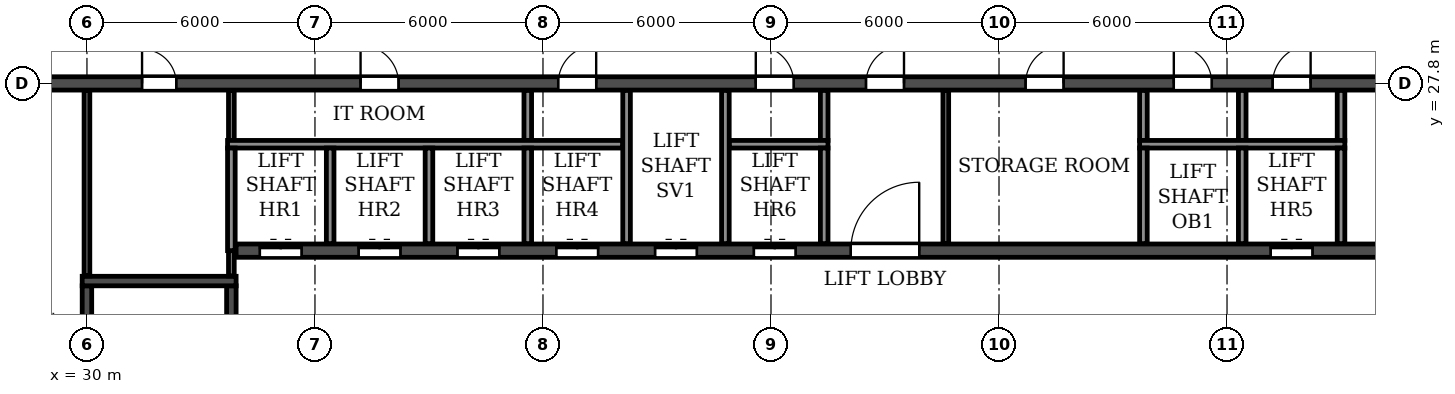
"""IFC4 building model, lengths in metres.
Left out: names, types, materials, properties, quantities, classifications, styles, units other than length and angle.
Written with IfcOpenShell. Run it as: python <this file> out.ifc"""

import sys

from ifc_helpers import new_model, si_unit, direction, frame, frame_2d, origin, place, context, subcontext, project, spatial, rectangle, extrude, element, fill, save


model = new_model("IFC4")
c1 = context("Model", 3, precision=1e-05, world=origin(), true_north=direction((0.0, 1.0)))
c2 = subcontext(c1, "Body", "Model", "MODEL_VIEW")
j1 = project(units=[si_unit("LENGTHUNIT", "METRE"), si_unit("PLANEANGLEUNIT", "RADIAN")], contexts=[c1])
p1 = place(None, origin())
s1 = spatial("IfcSite", under=j1, at=p1, CompositionType="ELEMENT")
p2 = place(p1, origin())
s2 = spatial("IfcBuilding", under=s1, at=p2, CompositionType="ELEMENT")
p3 = place(p2, frame((0.0, 0.0, 251.1)))
s3 = spatial("IfcBuildingStorey", under=s2, at=p3, CompositionType="ELEMENT", Elevation=251.1)
p4 = place(p3, frame((18.2, 27.8, 0.0), z_axis=(0.0, 0.0, 1.0), x_axis=(1.0, 0.0, 0.0)))
e1 = element("IfcWall", 1, at=p4, inside=s3, PredefinedType="SOLIDWALL", context=c2, shape_type="SweptSolid", body=[
    extrude(rectangle(XDim=65.6, YDim=0.35, at=frame_2d((32.8, 0.0))), origin(), (0.0, 0.0, 1.0), 3.08),
])
p5 = place(p4, frame((0.7, 0.0, 0.0)))
e2 = element("IfcOpeningElement", 2, at=p5, cuts=e1, PredefinedType="OPENING", context=c2, shape_type="SweptSolid", body=[
    extrude(rectangle(XDim=1.0, YDim=2.1, at=frame_2d((0.5, 1.05))), frame((0.0, 0.185, 0.0), z_axis=(0.0, -1.0, 0.0), x_axis=(1.0, 0.0, 0.0)), (0.0, 0.0, 1.0), 0.37),
])
p6 = place(p4, frame((4.05, 0.0, 0.0)))
e3 = element("IfcOpeningElement", 3, at=p6, cuts=e1, PredefinedType="OPENING", context=c2, shape_type="SweptSolid", body=[
    extrude(rectangle(XDim=0.9, YDim=2.1, at=frame_2d((0.45, 1.05))), frame((0.0, 0.185, 0.0), z_axis=(0.0, -1.0, 0.0), x_axis=(1.0, 0.0, 0.0)), (0.0, 0.0, 1.0), 0.37),
])
p7 = place(p4, frame((13.25, 0.0, 0.0)))
e4 = element("IfcOpeningElement", 4, at=p7, cuts=e1, PredefinedType="OPENING", context=c2, shape_type="SweptSolid", body=[
    extrude(rectangle(XDim=0.9, YDim=2.1, at=frame_2d((0.45, 1.05))), frame((0.0, 0.185, 0.0), z_axis=(0.0, -1.0, 0.0), x_axis=(1.0, 0.0, 0.0)), (0.0, 0.0, 1.0), 0.37),
])
p8 = place(p4, frame((19.0, 0.0, 0.0)))
e5 = element("IfcOpeningElement", 5, at=p8, cuts=e1, PredefinedType="OPENING", context=c2, shape_type="SweptSolid", body=[
    extrude(rectangle(XDim=1.0, YDim=2.1, at=frame_2d((0.5, 1.05))), frame((0.0, 0.185, 0.0), z_axis=(0.0, -1.0, 0.0), x_axis=(1.0, 0.0, 0.0)), (0.0, 0.0, 1.0), 0.37),
])
p9 = place(p4, frame((24.2, 0.0, 0.0)))
e6 = element("IfcOpeningElement", 6, at=p9, cuts=e1, PredefinedType="OPENING", context=c2, shape_type="SweptSolid", body=[
    extrude(rectangle(XDim=1.0, YDim=2.1, at=frame_2d((0.5, 1.05))), frame((0.0, 0.185, 0.0), z_axis=(0.0, -1.0, 0.0), x_axis=(1.0, 0.0, 0.0)), (0.0, 0.0, 1.0), 0.37),
])
p10 = place(p4, frame((29.4, 0.0, 0.0)))
e7 = element("IfcOpeningElement", 7, at=p10, cuts=e1, PredefinedType="OPENING", context=c2, shape_type="SweptSolid", body=[
    extrude(rectangle(XDim=1.0, YDim=2.1, at=frame_2d((0.5, 1.05))), frame((0.0, 0.185, 0.0), z_axis=(0.0, -1.0, 0.0), x_axis=(1.0, 0.0, 0.0)), (0.0, 0.0, 1.0), 0.37),
])
p11 = place(p4, frame((32.3, 0.0, 0.0)))
e8 = element("IfcOpeningElement", 8, at=p11, cuts=e1, PredefinedType="OPENING", context=c2, shape_type="SweptSolid", body=[
    extrude(rectangle(XDim=1.0, YDim=2.1, at=frame_2d((0.5, 1.05))), frame((0.0, 0.185, 0.0), z_axis=(0.0, -1.0, 0.0), x_axis=(1.0, 0.0, 0.0)), (0.0, 0.0, 1.0), 0.37),
])
p12 = place(p4, frame((36.5, 0.0, 0.0)))
e9 = element("IfcOpeningElement", 9, at=p12, cuts=e1, PredefinedType="OPENING", context=c2, shape_type="SweptSolid", body=[
    extrude(rectangle(XDim=1.0, YDim=2.1, at=frame_2d((0.5, 1.05))), frame((0.0, 0.185, 0.0), z_axis=(0.0, -1.0, 0.0), x_axis=(1.0, 0.0, 0.0)), (0.0, 0.0, 1.0), 0.37),
])
p13 = place(p4, frame((40.4, 0.0, 0.0)))
e10 = element("IfcOpeningElement", 10, at=p13, cuts=e1, PredefinedType="OPENING", context=c2, shape_type="SweptSolid", body=[
    extrude(rectangle(XDim=1.0, YDim=2.1, at=frame_2d((0.5, 1.05))), frame((0.0, 0.185, 0.0), z_axis=(0.0, -1.0, 0.0), x_axis=(1.0, 0.0, 0.0)), (0.0, 0.0, 1.0), 0.37),
])
p14 = place(p4, frame((43.0, 0.0, 0.0)))
e11 = element("IfcOpeningElement", 11, at=p14, cuts=e1, PredefinedType="OPENING", context=c2, shape_type="SweptSolid", body=[
    extrude(rectangle(XDim=1.0, YDim=2.1, at=frame_2d((0.5, 1.05))), frame((0.0, 0.185, 0.0), z_axis=(0.0, -1.0, 0.0), x_axis=(1.0, 0.0, 0.0)), (0.0, 0.0, 1.0), 0.37),
])
p15 = place(p4, frame((46.65, 0.0, 0.0)))
e12 = element("IfcOpeningElement", 12, at=p15, cuts=e1, PredefinedType="OPENING", context=c2, shape_type="SweptSolid", body=[
    extrude(rectangle(XDim=1.5, YDim=2.1, at=frame_2d((0.75, 1.05))), frame((0.0, 0.185, 0.0), z_axis=(0.0, -1.0, 0.0), x_axis=(1.0, 0.0, 0.0)), (0.0, 0.0, 1.0), 0.37),
])
p16 = place(p4, frame((51.45, 0.0, 0.0)))
e13 = element("IfcOpeningElement", 13, at=p16, cuts=e1, PredefinedType="OPENING", context=c2, shape_type="SweptSolid", body=[
    extrude(rectangle(XDim=0.9, YDim=2.1, at=frame_2d((0.45, 1.05))), frame((0.0, 0.185, 0.0), z_axis=(0.0, -1.0, 0.0), x_axis=(1.0, 0.0, 0.0)), (0.0, 0.0, 1.0), 0.37),
])
p17 = place(p4, frame((60.65, 0.0, 0.0)))
e14 = element("IfcOpeningElement", 14, at=p17, cuts=e1, PredefinedType="OPENING", context=c2, shape_type="SweptSolid", body=[
    extrude(rectangle(XDim=0.9, YDim=2.1, at=frame_2d((0.45, 1.05))), frame((0.0, 0.185, 0.0), z_axis=(0.0, -1.0, 0.0), x_axis=(1.0, 0.0, 0.0)), (0.0, 0.0, 1.0), 0.37),
])
p18 = place(p4, frame((63.9, 0.0, 0.0)))
e15 = element("IfcOpeningElement", 15, at=p18, cuts=e1, PredefinedType="OPENING", context=c2, shape_type="SweptSolid", body=[
    extrude(rectangle(XDim=1.0, YDim=2.1, at=frame_2d((0.5, 1.05))), frame((0.0, 0.185, 0.0), z_axis=(0.0, -1.0, 0.0), x_axis=(1.0, 0.0, 0.0)), (0.0, 0.0, 1.0), 0.37),
])
p19 = place(p3, frame((33.925, 23.4, 0.0), z_axis=(0.0, 0.0, 1.0), x_axis=(1.0, 0.0, 0.0)))
e16 = element("IfcWall", 16, at=p19, inside=s3, PredefinedType="SOLIDWALL", context=c2, shape_type="SweptSolid", body=[
    extrude(rectangle(XDim=34.15, YDim=0.35, at=frame_2d((17.075, 0.0))), origin(), (0.0, 0.0, 1.0), 3.08),
])
p20 = place(p19, frame((16.175, 0.0, 0.0)))
e17 = element("IfcOpeningElement", 17, at=p20, cuts=e16, PredefinedType="OPENING", context=c2, shape_type="SweptSolid", body=[
    extrude(rectangle(XDim=1.8, YDim=2.1, at=frame_2d((0.9, 1.05))), frame((0.0, 0.185, 0.0), z_axis=(0.0, -1.0, 0.0), x_axis=(1.0, 0.0, 0.0)), (0.0, 0.0, 1.0), 0.37),
])
p21 = place(p19, frame((0.625, 0.0, 0.0)))
e18 = element("IfcOpeningElement", 18, at=p21, cuts=e16, PredefinedType="OPENING", context=c2, shape_type="SweptSolid", body=[
    extrude(rectangle(XDim=1.1, YDim=2.1, at=frame_2d((0.55, 1.05))), frame((0.0, 0.185, 0.0), z_axis=(0.0, -1.0, 0.0), x_axis=(1.0, 0.0, 0.0)), (0.0, 0.0, 1.0), 0.37),
])
p22 = place(p19, frame((3.225, 0.0, 0.0)))
e19 = element("IfcOpeningElement", 19, at=p22, cuts=e16, PredefinedType="OPENING", context=c2, shape_type="SweptSolid", body=[
    extrude(rectangle(XDim=1.1, YDim=2.1, at=frame_2d((0.55, 1.05))), frame((0.0, 0.185, 0.0), z_axis=(0.0, -1.0, 0.0), x_axis=(1.0, 0.0, 0.0)), (0.0, 0.0, 1.0), 0.37),
])
p23 = place(p19, frame((5.825, 0.0, 0.0)))
e20 = element("IfcOpeningElement", 20, at=p23, cuts=e16, PredefinedType="OPENING", context=c2, shape_type="SweptSolid", body=[
    extrude(rectangle(XDim=1.1, YDim=2.1, at=frame_2d((0.55, 1.05))), frame((0.0, 0.185, 0.0), z_axis=(0.0, -1.0, 0.0), x_axis=(1.0, 0.0, 0.0)), (0.0, 0.0, 1.0), 0.37),
])
p24 = place(p19, frame((8.425, 0.0, 0.0)))
e21 = element("IfcOpeningElement", 21, at=p24, cuts=e16, PredefinedType="OPENING", context=c2, shape_type="SweptSolid", body=[
    extrude(rectangle(XDim=1.1, YDim=2.1, at=frame_2d((0.55, 1.05))), frame((0.0, 0.185, 0.0), z_axis=(0.0, -1.0, 0.0), x_axis=(1.0, 0.0, 0.0)), (0.0, 0.0, 1.0), 0.37),
])
p25 = place(p19, frame((11.025, 0.0, 0.0)))
e22 = element("IfcOpeningElement", 22, at=p25, cuts=e16, PredefinedType="OPENING", context=c2, shape_type="SweptSolid", body=[
    extrude(rectangle(XDim=1.1, YDim=2.1, at=frame_2d((0.55, 1.05))), frame((0.0, 0.185, 0.0), z_axis=(0.0, -1.0, 0.0), x_axis=(1.0, 0.0, 0.0)), (0.0, 0.0, 1.0), 0.37),
])
p26 = place(p19, frame((13.625, 0.0, 0.0)))
e23 = element("IfcOpeningElement", 23, at=p26, cuts=e16, PredefinedType="OPENING", context=c2, shape_type="SweptSolid", body=[
    extrude(rectangle(XDim=1.1, YDim=2.1, at=frame_2d((0.55, 1.05))), frame((0.0, 0.185, 0.0), z_axis=(0.0, -1.0, 0.0), x_axis=(1.0, 0.0, 0.0)), (0.0, 0.0, 1.0), 0.37),
])
p27 = place(p19, frame((27.225, 0.0, 0.0)))
e24 = element("IfcOpeningElement", 24, at=p27, cuts=e16, PredefinedType="OPENING", context=c2, shape_type="SweptSolid", body=[
    extrude(rectangle(XDim=1.1, YDim=2.1, at=frame_2d((0.55, 1.05))), frame((0.0, 0.185, 0.0), z_axis=(0.0, -1.0, 0.0), x_axis=(1.0, 0.0, 0.0)), (0.0, 0.0, 1.0), 0.37),
])
p28 = place(p3, frame((30.0, 14.775, 0.0), z_axis=(0.0, 0.0, 1.0), x_axis=(0.0, 1.0, 0.0)))
e25 = element("IfcWall", 25, at=p28, inside=s3, PredefinedType="SOLIDWALL", context=c2, shape_type="SweptSolid", body=[
    extrude(rectangle(XDim=7.7, YDim=0.25, at=frame_2d((3.85, 0.0))), origin(), (0.0, 0.0, 1.0), 3.08),
])
p29 = place(p3, frame((33.8, 14.775, 0.0), z_axis=(0.0, 0.0, 1.0), x_axis=(0.0, 1.0, 0.0)))
e26 = element("IfcWall", 26, at=p29, inside=s3, PredefinedType="SOLIDWALL", context=c2, shape_type="SweptSolid", body=[
    extrude(rectangle(XDim=7.7, YDim=0.25, at=frame_2d((3.85, 0.0))), origin(), (0.0, 0.0, 1.0), 3.08),
])
p30 = place(p29, frame((0.525, 0.0, 0.0)))
e27 = element("IfcOpeningElement", 27, at=p30, cuts=e26, PredefinedType="OPENING", context=c2, shape_type="SweptSolid", body=[
    extrude(rectangle(XDim=1.0, YDim=2.1, at=frame_2d((0.5, 1.05))), frame((0.0, 0.135, 0.0), z_axis=(0.0, -1.0, 0.0), x_axis=(1.0, 0.0, 0.0)), (0.0, 0.0, 1.0), 0.27),
])
p31 = place(p3, frame((29.875, 22.6, 0.0), z_axis=(0.0, 0.0, 1.0), x_axis=(1.0, 0.0, 0.0)))
e28 = element("IfcWall", 28, at=p31, inside=s3, PredefinedType="SOLIDWALL", context=c2, shape_type="SweptSolid", body=[
    extrude(rectangle(XDim=4.05, YDim=0.25, at=frame_2d((2.025, 0.0))), origin(), (0.0, 0.0, 1.0), 3.08),
])
p32 = place(p3, frame((52.6, 23.585, 0.0), z_axis=(0.0, 0.0, 1.0), x_axis=(0.0, 1.0, 0.0)))
e29 = element("IfcWall", 29, at=p32, inside=s3, PredefinedType="PARTITIONING", context=c2, shape_type="SweptSolid", body=[
    extrude(rectangle(XDim=4.03, YDim=0.15, at=frame_2d((2.015, 0.0))), origin(), (0.0, 0.0, 1.0), 3.08),
])
for number, where, z_axis, x_axis in (
    (30, (41.6, 26.3, 0.0), (0.0, 0.0, 1.0), (0.0, 1.0, 0.0)),
    (31, (49.4, 26.3, 0.0), (0.0, 0.0, 1.0), (0.0, 1.0, 0.0)),
    (32, (57.8, 26.3, 0.0), (0.0, 0.0, 1.0), (0.0, 1.0, 0.0)),
    (33, (60.4, 26.3, 0.0), (0.0, 0.0, 1.0), (0.0, 1.0, 0.0)),
    (34, (63.0, 26.3, 0.0), (0.0, 0.0, 1.0), (0.0, 1.0, 0.0)),
):
    element("IfcWall", number, at=place(p3, frame(where, z_axis=z_axis, x_axis=x_axis)), inside=s3, PredefinedType="PARTITIONING", context=c2, shape_type="SweptSolid", body=[
        extrude(rectangle(XDim=1.315, YDim=0.2, at=frame_2d((0.657, 0.0))), origin(), (0.0, 0.0, 1.0), 3.08),
    ])
p33 = place(p3, frame((30.0, 22.735, 0.0), z_axis=(0.0, 0.0, 1.0), x_axis=(0.0, 1.0, 0.0)))
e35 = element("IfcWall", 35, at=p33, inside=s3, PredefinedType="PARTITIONING", context=c2, shape_type="SweptSolid", body=[
    extrude(rectangle(XDim=4.88, YDim=0.15, at=frame_2d((2.44, 0.0))), origin(), (0.0, 0.0, 1.0), 3.08),
])
p34 = place(p3, frame((33.8, 22.735, 0.0), z_axis=(0.0, 0.0, 1.0), x_axis=(0.0, 1.0, 0.0)))
e36 = element("IfcWall", 36, at=p34, inside=s3, PredefinedType="PARTITIONING", context=c2, shape_type="SweptSolid", body=[
    extrude(rectangle(XDim=0.665, YDim=0.15, at=frame_2d((0.333, 0.0))), origin(), (0.0, 0.0, 1.0), 3.08),
])
p35 = place(p3, frame((33.8, 26.3, 0.0), z_axis=(0.0, 0.0, 1.0), x_axis=(0.0, 1.0, 0.0)))
e37 = element("IfcWall", 37, at=p35, inside=s3, PredefinedType="PARTITIONING", context=c2, shape_type="SweptSolid", body=[
    extrude(rectangle(XDim=1.315, YDim=0.15, at=frame_2d((0.657, 0.0))), origin(), (0.0, 0.0, 1.0), 3.08),
])
p36 = place(p3, frame((33.7, 26.2, 0.0), z_axis=(0.0, 0.0, 1.0), x_axis=(1.0, 0.0, 0.0)))
e38 = element("IfcWall", 38, at=p36, inside=s3, PredefinedType="PARTITIONING", context=c2, shape_type="SweptSolid", body=[
    extrude(rectangle(XDim=10.4, YDim=0.2, at=frame_2d((5.2, 0.0))), origin(), (0.0, 0.0, 1.0), 3.08),
])
p37 = place(p3, frame((46.9, 26.2, 0.0), z_axis=(0.0, 0.0, 1.0), x_axis=(1.0, 0.0, 0.0)))
e39 = element("IfcWall", 39, at=p37, inside=s3, PredefinedType="PARTITIONING", context=c2, shape_type="SweptSolid", body=[
    extrude(rectangle(XDim=2.6, YDim=0.2, at=frame_2d((1.3, 0.0))), origin(), (0.0, 0.0, 1.0), 3.08),
])
p38 = place(p3, frame((57.7, 26.2, 0.0), z_axis=(0.0, 0.0, 1.0), x_axis=(1.0, 0.0, 0.0)))
e40 = element("IfcWall", 40, at=p38, inside=s3, PredefinedType="PARTITIONING", context=c2, shape_type="SweptSolid", body=[
    extrude(rectangle(XDim=5.4, YDim=0.2, at=frame_2d((2.7, 0.0))), origin(), (0.0, 0.0, 1.0), 3.08),
])
p39 = place(p3, frame((33.8, 23.4, 0.0), z_axis=(0.0, 0.0, 1.0), x_axis=(0.0, 1.0, 0.0)))
e41 = element("IfcWall", 41, at=p39, inside=s3, PredefinedType="PARTITIONING", context=c2, shape_type="SweptSolid", body=[
    extrude(rectangle(XDim=2.7, YDim=0.2, at=frame_2d((1.35, 0.0))), origin(), (0.0, 0.0, 1.0), 3.08),
])
for number, where, z_axis, x_axis in (
    (42, (36.4, 23.585, 0.0), (0.0, 0.0, 1.0), (0.0, 1.0, 0.0)),
    (43, (39.0, 23.585, 0.0), (0.0, 0.0, 1.0), (0.0, 1.0, 0.0)),
    (44, (41.6, 23.585, 0.0), (0.0, 0.0, 1.0), (0.0, 1.0, 0.0)),
):
    element("IfcWall", number, at=place(p3, frame(where, z_axis=z_axis, x_axis=x_axis)), inside=s3, PredefinedType="PARTITIONING", context=c2, shape_type="SweptSolid", body=[
        extrude(rectangle(XDim=2.515, YDim=0.2, at=frame_2d((1.258, 0.0))), origin(), (0.0, 0.0, 1.0), 3.08),
    ])
for number, where, z_axis, x_axis in (
    (45, (44.2, 23.585, 0.0), (0.0, 0.0, 1.0), (0.0, 1.0, 0.0)),
    (46, (46.8, 23.585, 0.0), (0.0, 0.0, 1.0), (0.0, 1.0, 0.0)),
):
    element("IfcWall", number, at=place(p3, frame(where, z_axis=z_axis, x_axis=x_axis)), inside=s3, PredefinedType="PARTITIONING", context=c2, shape_type="SweptSolid", body=[
        extrude(rectangle(XDim=4.03, YDim=0.2, at=frame_2d((2.015, 0.0))), origin(), (0.0, 0.0, 1.0), 3.08),
    ])
for number, where, z_axis, x_axis in (
    (47, (49.4, 23.585, 0.0), (0.0, 0.0, 1.0), (0.0, 1.0, 0.0)),
    (48, (57.8, 23.585, 0.0), (0.0, 0.0, 1.0), (0.0, 1.0, 0.0)),
    (49, (60.4, 23.585, 0.0), (0.0, 0.0, 1.0), (0.0, 1.0, 0.0)),
    (50, (63.0, 23.585, 0.0), (0.0, 0.0, 1.0), (0.0, 1.0, 0.0)),
):
    element("IfcWall", number, at=place(p3, frame(where, z_axis=z_axis, x_axis=x_axis)), inside=s3, PredefinedType="PARTITIONING", context=c2, shape_type="SweptSolid", body=[
        extrude(rectangle(XDim=2.515, YDim=0.2, at=frame_2d((1.258, 0.0))), origin(), (0.0, 0.0, 1.0), 3.08),
    ])
p40 = place(p7, origin())
e51 = element("IfcDoor", 51, at=p40, inside=s3, OperationType="SINGLE_SWING_LEFT", PredefinedType="DOOR", context=c2, shape_type="SweptSolid", body=[
    extrude(rectangle(XDim=0.9, YDim=2.1, at=frame_2d((0.45, 1.05))), frame((0.0, 0.025, 0.0), z_axis=(0.0, -1.0, 0.0), x_axis=(1.0, 0.0, 0.0)), (0.0, 0.0, 1.0), 0.05),
])
fill(e4, e51)
p41 = place(p8, origin())
e52 = element("IfcDoor", 52, at=p41, inside=s3, OperationType="SINGLE_SWING_LEFT", PredefinedType="DOOR", context=c2, shape_type="SweptSolid", body=[
    extrude(rectangle(XDim=1.0, YDim=2.1, at=frame_2d((0.5, 1.05))), frame((0.0, 0.025, 0.0), z_axis=(0.0, -1.0, 0.0), x_axis=(1.0, 0.0, 0.0)), (0.0, 0.0, 1.0), 0.05),
])
fill(e5, e52)
p42 = place(p9, origin())
e53 = element("IfcDoor", 53, at=p42, inside=s3, OperationType="SINGLE_SWING_RIGHT", PredefinedType="DOOR", context=c2, shape_type="SweptSolid", body=[
    extrude(rectangle(XDim=1.0, YDim=2.1, at=frame_2d((0.5, 1.05))), frame((0.0, 0.025, 0.0), z_axis=(0.0, -1.0, 0.0), x_axis=(1.0, 0.0, 0.0)), (0.0, 0.0, 1.0), 0.05),
])
fill(e6, e53)
p43 = place(p10, origin())
e54 = element("IfcDoor", 54, at=p43, inside=s3, OperationType="SINGLE_SWING_LEFT", PredefinedType="DOOR", context=c2, shape_type="SweptSolid", body=[
    extrude(rectangle(XDim=1.0, YDim=2.1, at=frame_2d((0.5, 1.05))), frame((0.0, 0.025, 0.0), z_axis=(0.0, -1.0, 0.0), x_axis=(1.0, 0.0, 0.0)), (0.0, 0.0, 1.0), 0.05),
])
fill(e7, e54)
p44 = place(p11, origin())
e55 = element("IfcDoor", 55, at=p44, inside=s3, OperationType="SINGLE_SWING_RIGHT", PredefinedType="DOOR", context=c2, shape_type="SweptSolid", body=[
    extrude(rectangle(XDim=1.0, YDim=2.1, at=frame_2d((0.5, 1.05))), frame((0.0, 0.025, 0.0), z_axis=(0.0, -1.0, 0.0), x_axis=(1.0, 0.0, 0.0)), (0.0, 0.0, 1.0), 0.05),
])
fill(e8, e55)
p45 = place(p12, origin())
e56 = element("IfcDoor", 56, at=p45, inside=s3, OperationType="SINGLE_SWING_RIGHT", PredefinedType="DOOR", context=c2, shape_type="SweptSolid", body=[
    extrude(rectangle(XDim=1.0, YDim=2.1, at=frame_2d((0.5, 1.05))), frame((0.0, 0.025, 0.0), z_axis=(0.0, -1.0, 0.0), x_axis=(1.0, 0.0, 0.0)), (0.0, 0.0, 1.0), 0.05),
])
fill(e9, e56)
p46 = place(p13, origin())
e57 = element("IfcDoor", 57, at=p46, inside=s3, OperationType="SINGLE_SWING_LEFT", PredefinedType="DOOR", context=c2, shape_type="SweptSolid", body=[
    extrude(rectangle(XDim=1.0, YDim=2.1, at=frame_2d((0.5, 1.05))), frame((0.0, 0.025, 0.0), z_axis=(0.0, -1.0, 0.0), x_axis=(1.0, 0.0, 0.0)), (0.0, 0.0, 1.0), 0.05),
])
fill(e10, e57)
p47 = place(p14, origin())
e58 = element("IfcDoor", 58, at=p47, inside=s3, OperationType="SINGLE_SWING_RIGHT", PredefinedType="DOOR", context=c2, shape_type="SweptSolid", body=[
    extrude(rectangle(XDim=1.0, YDim=2.1, at=frame_2d((0.5, 1.05))), frame((0.0, 0.025, 0.0), z_axis=(0.0, -1.0, 0.0), x_axis=(1.0, 0.0, 0.0)), (0.0, 0.0, 1.0), 0.05),
])
fill(e11, e58)
p48 = place(p20, origin())
e59 = element("IfcDoor", 59, at=p48, inside=s3, OperationType="DOUBLE_DOOR_SINGLE_SWING", PredefinedType="DOOR", context=c2, shape_type="SweptSolid", body=[
    extrude(rectangle(XDim=1.8, YDim=2.1, at=frame_2d((0.9, 1.05))), frame((0.0, 0.025, 0.0), z_axis=(0.0, -1.0, 0.0), x_axis=(1.0, 0.0, 0.0)), (0.0, 0.0, 1.0), 0.05),
])
fill(e17, e59)
p49 = place(p21, origin())
e60 = element("IfcDoor", 60, at=p49, inside=s3, OperationType="DOUBLE_DOOR_SLIDING", PredefinedType="DOOR", context=c2, shape_type="SweptSolid", body=[
    extrude(rectangle(XDim=1.1, YDim=2.1, at=frame_2d((0.55, 1.05))), frame((0.0, 0.025, 0.0), z_axis=(0.0, -1.0, 0.0), x_axis=(1.0, 0.0, 0.0)), (0.0, 0.0, 1.0), 0.05),
])
fill(e18, e60)
p50 = place(p22, origin())
e61 = element("IfcDoor", 61, at=p50, inside=s3, OperationType="DOUBLE_DOOR_SLIDING", PredefinedType="DOOR", context=c2, shape_type="SweptSolid", body=[
    extrude(rectangle(XDim=1.1, YDim=2.1, at=frame_2d((0.55, 1.05))), frame((0.0, 0.025, 0.0), z_axis=(0.0, -1.0, 0.0), x_axis=(1.0, 0.0, 0.0)), (0.0, 0.0, 1.0), 0.05),
])
fill(e19, e61)
p51 = place(p23, origin())
e62 = element("IfcDoor", 62, at=p51, inside=s3, OperationType="DOUBLE_DOOR_SLIDING", PredefinedType="DOOR", context=c2, shape_type="SweptSolid", body=[
    extrude(rectangle(XDim=1.1, YDim=2.1, at=frame_2d((0.55, 1.05))), frame((0.0, 0.025, 0.0), z_axis=(0.0, -1.0, 0.0), x_axis=(1.0, 0.0, 0.0)), (0.0, 0.0, 1.0), 0.05),
])
fill(e20, e62)
p52 = place(p24, origin())
e63 = element("IfcDoor", 63, at=p52, inside=s3, OperationType="DOUBLE_DOOR_SLIDING", PredefinedType="DOOR", context=c2, shape_type="SweptSolid", body=[
    extrude(rectangle(XDim=1.1, YDim=2.1, at=frame_2d((0.55, 1.05))), frame((0.0, 0.025, 0.0), z_axis=(0.0, -1.0, 0.0), x_axis=(1.0, 0.0, 0.0)), (0.0, 0.0, 1.0), 0.05),
])
fill(e21, e63)
p53 = place(p25, origin())
e64 = element("IfcDoor", 64, at=p53, inside=s3, OperationType="DOUBLE_DOOR_SLIDING", PredefinedType="DOOR", context=c2, shape_type="SweptSolid", body=[
    extrude(rectangle(XDim=1.1, YDim=2.1, at=frame_2d((0.55, 1.05))), frame((0.0, 0.025, 0.0), z_axis=(0.0, -1.0, 0.0), x_axis=(1.0, 0.0, 0.0)), (0.0, 0.0, 1.0), 0.05),
])
fill(e22, e64)
p54 = place(p26, origin())
e65 = element("IfcDoor", 65, at=p54, inside=s3, OperationType="DOUBLE_DOOR_SLIDING", PredefinedType="DOOR", context=c2, shape_type="SweptSolid", body=[
    extrude(rectangle(XDim=1.1, YDim=2.1, at=frame_2d((0.55, 1.05))), frame((0.0, 0.025, 0.0), z_axis=(0.0, -1.0, 0.0), x_axis=(1.0, 0.0, 0.0)), (0.0, 0.0, 1.0), 0.05),
])
fill(e23, e65)
p55 = place(p27, origin())
e66 = element("IfcDoor", 66, at=p55, inside=s3, OperationType="DOUBLE_DOOR_SLIDING", PredefinedType="DOOR", context=c2, shape_type="SweptSolid", body=[
    extrude(rectangle(XDim=1.1, YDim=2.1, at=frame_2d((0.55, 1.05))), frame((0.0, 0.025, 0.0), z_axis=(0.0, -1.0, 0.0), x_axis=(1.0, 0.0, 0.0)), (0.0, 0.0, 1.0), 0.05),
])
fill(e24, e66)
save(model, sys.argv[1])
